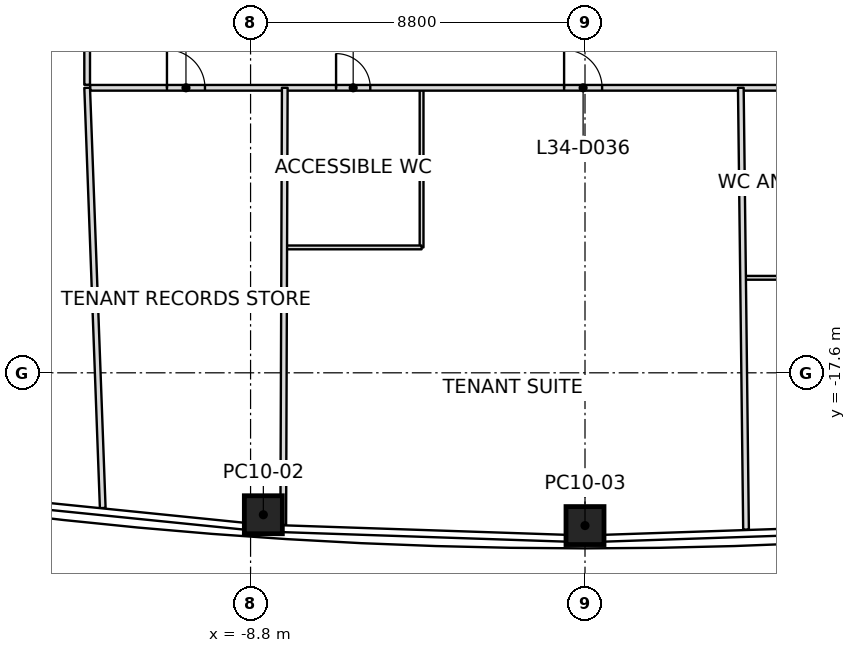
"""IFC4 building model, lengths in metres.
Left out: names, types, materials, properties, quantities, classifications, styles, units other than length and angle.
Written with IfcOpenShell. Run it as: python <this file> out.ifc"""

import sys

from ifc_helpers import new_model, si_unit, direction, frame, frame_2d, origin, origin_2d, place, context, subcontext, project, spatial, rectangle, extrude, element, fill, save


model = new_model("IFC4")
c1 = context("Model", 3, precision=1e-05, world=origin(), true_north=direction((0.0, 1.0)))
c2 = subcontext(c1, "Body", "Model", "MODEL_VIEW")
j1 = project(units=[si_unit("LENGTHUNIT", "METRE"), si_unit("PLANEANGLEUNIT", "RADIAN")], contexts=[c1])
p1 = place(None, origin())
s1 = spatial("IfcSite", under=j1, at=p1, CompositionType="ELEMENT")
p2 = place(p1, origin())
s2 = spatial("IfcBuilding", under=s1, at=p2, CompositionType="ELEMENT")
p3 = place(p2, frame((0.0, 0.0, 157.8)))
s3 = spatial("IfcBuildingStorey", under=s2, at=p3, CompositionType="ELEMENT", Elevation=157.8)
p4 = place(p3, frame((-8.464, -21.335, 0.0), z_axis=(0.008849193104, 0.011229320904, 0.999897791843), x_axis=(-0.997698206582, 0.067328341757, 0.008073597722)))
e1 = element("IfcColumn", 1, at=p4, inside=s3, PredefinedType="COLUMN", context=c2, shape_type="SweptSolid", body=[
    extrude(rectangle(XDim=1.0, YDim=1.0, at=origin_2d()), origin(), (0.0, 0.0, 1.0), 4.0),
])
p5 = place(p3, frame((0.0, -21.62, 0.0), z_axis=(0.0, 0.011473854038, 0.99993417317), x_axis=(1.0, 0.0, 0.0)))
e2 = element("IfcColumn", 2, at=p5, inside=s3, PredefinedType="COLUMN", context=c2, shape_type="SweptSolid", body=[
    extrude(rectangle(XDim=1.0, YDim=1.0, at=origin_2d()), origin(), (0.0, 0.0, 1.0), 4.0),
])
p6 = place(p3, frame((-13.1, -10.1, 0.0), z_axis=(0.0, 0.0, 1.0), x_axis=(0.037085915045, -0.999312080836, 0.0)))
e3 = element("IfcWall", 3, at=p6, inside=s3, PredefinedType="PARTITIONING", context=c2, shape_type="SweptSolid", body=[
    extrude(rectangle(XDim=11.066, YDim=0.15, at=frame_2d((5.533, 0.0))), origin(), (0.0, 0.0, 1.0), 3.234),
])
p7 = place(p3, frame((-7.9, -10.1, 0.0), z_axis=(0.0, 0.0, 1.0), x_axis=(-0.003502047929, -0.999993867811, 0.0)))
e4 = element("IfcWall", 4, at=p7, inside=s3, PredefinedType="PARTITIONING", context=c2, shape_type="SweptSolid", body=[
    extrude(rectangle(XDim=11.503, YDim=0.15, at=frame_2d((5.751, 0.0))), origin(), (0.0, 0.0, 1.0), 3.234),
])
p8 = place(p3, frame((4.1, -10.1, 0.0), z_axis=(0.0, 0.0, 1.0), x_axis=(0.011799703395, -0.999930381077, 0.0)))
e5 = element("IfcWall", 5, at=p8, inside=s3, PredefinedType="PARTITIONING", context=c2, shape_type="SweptSolid", body=[
    extrude(rectangle(XDim=11.628, YDim=0.15, at=frame_2d((5.814, 0.0))), origin(), (0.0, 0.0, 1.0), 3.234),
])
p9 = place(p3, frame((-13.1, 10.02, 0.0), z_axis=(0.0, 0.0, 1.0), x_axis=(0.0, -1.0, 0.0)))
e6 = element("IfcWall", 6, at=p9, inside=s3, PredefinedType="PARTITIONING", context=c2, shape_type="SweptSolid", body=[
    extrude(rectangle(XDim=20.04, YDim=0.15, at=frame_2d((10.02, 0.0))), origin(), (0.0, 0.0, 1.0), 3.166),
])
p10 = place(p9, frame((3.51, 0.0, 0.0)))
e7 = element("IfcOpeningElement", 7, at=p10, cuts=e6, PredefinedType="OPENING", context=c2, shape_type="SweptSolid", body=[
    extrude(rectangle(XDim=1.0, YDim=2.1, at=frame_2d((0.5, 1.05))), frame((0.0, 0.075, 0.0), z_axis=(0.0, -1.0, 0.0), x_axis=(1.0, 0.0, 0.0)), (0.0, 0.0, 1.0), 0.15),
])
p11 = place(p9, frame((10.17, 0.0, 0.0)))
e8 = element("IfcOpeningElement", 8, at=p11, cuts=e6, PredefinedType="OPENING", context=c2, shape_type="SweptSolid", body=[
    extrude(rectangle(XDim=0.9, YDim=2.1, at=frame_2d((0.45, 1.05))), frame((0.0, 0.075, 0.0), z_axis=(0.0, -1.0, 0.0), x_axis=(1.0, 0.0, 0.0)), (0.0, 0.0, 1.0), 0.15),
])
p12 = place(p9, frame((16.18, 0.0, 0.0)))
e9 = element("IfcOpeningElement", 9, at=p12, cuts=e6, PredefinedType="OPENING", context=c2, shape_type="SweptSolid", body=[
    extrude(rectangle(XDim=1.0, YDim=2.1, at=frame_2d((0.5, 1.05))), frame((0.0, 0.075, 0.0), z_axis=(0.0, -1.0, 0.0), x_axis=(1.0, 0.0, 0.0)), (0.0, 0.0, 1.0), 0.15),
])
p13 = place(p3, frame((-13.02, -10.1, 0.0), z_axis=(0.0, 0.0, 1.0), x_axis=(1.0, 0.0, 0.0)))
e10 = element("IfcWall", 10, at=p13, inside=s3, PredefinedType="PARTITIONING", context=c2, shape_type="SweptSolid", body=[
    extrude(rectangle(XDim=26.12, YDim=0.15, at=frame_2d((13.06, 0.0))), origin(), (0.0, 0.0, 1.0), 3.317),
])
p14 = place(p13, frame((2.02, 0.0, 0.0)))
e11 = element("IfcOpeningElement", 11, at=p14, cuts=e10, PredefinedType="OPENING", context=c2, shape_type="SweptSolid", body=[
    extrude(rectangle(XDim=1.0, YDim=2.1, at=frame_2d((0.5, 1.05))), frame((0.0, 0.075, 0.0), z_axis=(0.0, -1.0, 0.0), x_axis=(1.0, 0.0, 0.0)), (0.0, 0.0, 1.0), 0.15),
])
p15 = place(p13, frame((6.47, 0.0, 0.0)))
e12 = element("IfcOpeningElement", 12, at=p15, cuts=e10, PredefinedType="OPENING", context=c2, shape_type="SweptSolid", body=[
    extrude(rectangle(XDim=0.9, YDim=2.1, at=frame_2d((0.45, 1.05))), frame((0.0, 0.075, 0.0), z_axis=(0.0, -1.0, 0.0), x_axis=(1.0, 0.0, 0.0)), (0.0, 0.0, 1.0), 0.15),
])
p16 = place(p13, frame((12.47, 0.0, 0.0)))
e13 = element("IfcOpeningElement", 13, at=p16, cuts=e10, PredefinedType="OPENING", context=c2, shape_type="SweptSolid", body=[
    extrude(rectangle(XDim=1.0, YDim=2.1, at=frame_2d((0.5, 1.05))), frame((0.0, 0.075, 0.0), z_axis=(0.0, -1.0, 0.0), x_axis=(1.0, 0.0, 0.0)), (0.0, 0.0, 1.0), 0.15),
])
p17 = place(p13, frame((18.77, 0.0, 0.0)))
e14 = element("IfcOpeningElement", 14, at=p17, cuts=e10, PredefinedType="OPENING", context=c2, shape_type="SweptSolid", body=[
    extrude(rectangle(XDim=0.9, YDim=2.1, at=frame_2d((0.45, 1.05))), frame((0.0, 0.075, 0.0), z_axis=(0.0, -1.0, 0.0), x_axis=(1.0, 0.0, 0.0)), (0.0, 0.0, 1.0), 0.15),
])
p18 = place(p13, frame((23.27, 0.0, 0.0)))
e15 = element("IfcOpeningElement", 15, at=p18, cuts=e10, PredefinedType="OPENING", context=c2, shape_type="SweptSolid", body=[
    extrude(rectangle(XDim=1.0, YDim=2.1, at=frame_2d((0.5, 1.05))), frame((0.0, 0.075, 0.0), z_axis=(0.0, -1.0, 0.0), x_axis=(1.0, 0.0, 0.0)), (0.0, 0.0, 1.0), 0.15),
])
p19 = place(p3, frame((-4.3, -10.13, 0.0), z_axis=(0.0, 0.0, 1.0), x_axis=(0.0, -1.0, 0.0)))
e16 = element("IfcWall", 16, at=p19, inside=s3, PredefinedType="PARTITIONING", context=c2, shape_type="SweptSolid", body=[
    extrude(rectangle(XDim=4.17, YDim=0.1, at=frame_2d((2.085, 0.0))), origin(), (0.0, 0.0, 1.0), 3.45),
])
p20 = place(p3, frame((-4.3, -14.3, 0.0), z_axis=(0.0, 0.0, 1.0), x_axis=(-1.0, 0.0, 0.0)))
e17 = element("IfcWall", 17, at=p20, inside=s3, PredefinedType="PARTITIONING", context=c2, shape_type="SweptSolid", body=[
    extrude(rectangle(XDim=3.57, YDim=0.1, at=frame_2d((1.785, 0.0))), origin(), (0.0, 0.0, 1.0), 3.317),
])
p21 = place(p3, frame((8.3, -15.1, 0.0), z_axis=(0.0, 0.0, 1.0), x_axis=(-1.0, 0.0, 0.0)))
e18 = element("IfcWall", 18, at=p21, inside=s3, PredefinedType="PARTITIONING", context=c2, shape_type="SweptSolid", body=[
    extrude(rectangle(XDim=4.17, YDim=0.1, at=frame_2d((2.085, 0.0))), origin(), (0.0, 0.0, 1.0), 3.317),
])
p22 = place(p14, origin())
e19 = element("IfcDoor", 19, at=p22, inside=s3, OperationType="SINGLE_SWING_LEFT", PredefinedType="DOOR", context=c2, shape_type="SweptSolid", body=[
    extrude(rectangle(XDim=1.0, YDim=2.1, at=frame_2d((0.5, 1.05))), frame((0.0, 0.025, 0.0), z_axis=(0.0, -1.0, 0.0), x_axis=(1.0, 0.0, 0.0)), (0.0, 0.0, 1.0), 0.05),
])
fill(e11, e19)
p23 = place(p15, origin())
e20 = element("IfcDoor", 20, at=p23, inside=s3, OperationType="SINGLE_SWING_RIGHT", PredefinedType="DOOR", context=c2, shape_type="SweptSolid", body=[
    extrude(rectangle(XDim=0.9, YDim=2.1, at=frame_2d((0.45, 1.05))), frame((0.0, 0.025, 0.0), z_axis=(0.0, -1.0, 0.0), x_axis=(1.0, 0.0, 0.0)), (0.0, 0.0, 1.0), 0.05),
])
fill(e12, e20)
p24 = place(p16, origin())
e21 = element("IfcDoor", 21, at=p24, inside=s3, OperationType="SINGLE_SWING_LEFT", PredefinedType="DOOR", context=c2, shape_type="SweptSolid", body=[
    extrude(rectangle(XDim=1.0, YDim=2.1, at=frame_2d((0.5, 1.05))), frame((0.0, 0.025, 0.0), z_axis=(0.0, -1.0, 0.0), x_axis=(1.0, 0.0, 0.0)), (0.0, 0.0, 1.0), 0.05),
])
fill(e13, e21)
save(model, sys.argv[1])
